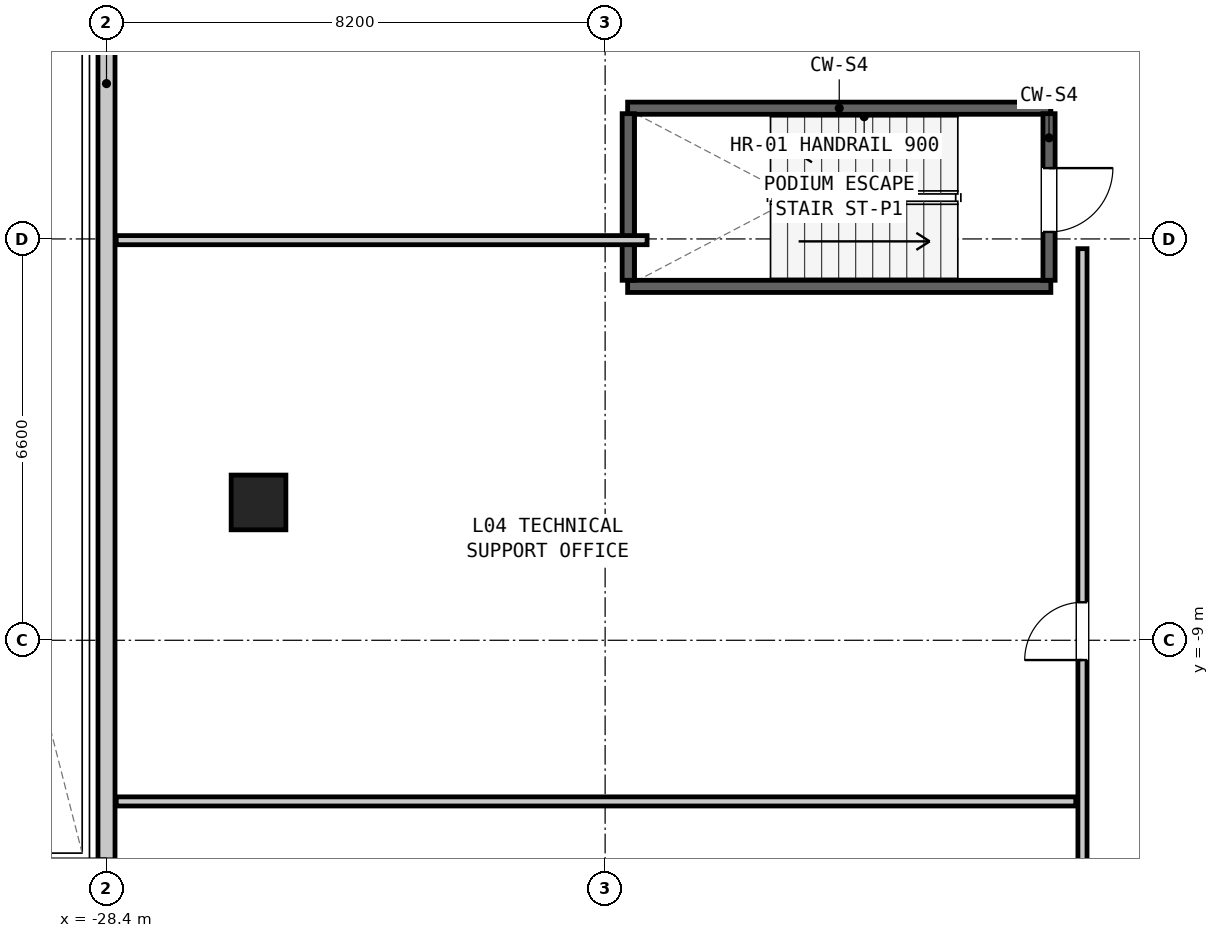
"""IFC4 building model, lengths in metres.
Left out: names, types, materials, properties, quantities, classifications, styles, units other than length and angle.
Written with IfcOpenShell. Run it as: python <this file> out.ifc"""

import sys

from ifc_helpers import new_model, si_unit, direction, frame, frame_2d, origin, origin_2d, place, context, subcontext, project, spatial, rectangle, hollow_rectangle, extrude, element, fill, save


model = new_model("IFC4")
c1 = context("Model", 3, precision=1e-05, world=origin(), true_north=direction((0.0, 1.0)))
c2 = subcontext(c1, "Body", "Model", "MODEL_VIEW")
j1 = project(units=[si_unit("LENGTHUNIT", "METRE"), si_unit("PLANEANGLEUNIT", "RADIAN")], contexts=[c1])
p1 = place(None, origin())
s1 = spatial("IfcSite", under=j1, at=p1, CompositionType="ELEMENT")
p2 = place(p1, origin())
s2 = spatial("IfcBuilding", under=s1, at=p2, CompositionType="ELEMENT")
p3 = place(p2, frame((0.0, 0.0, 17.7)))
s3 = spatial("IfcBuildingStorey", under=s2, at=p3, CompositionType="ELEMENT", Elevation=17.7)
p4 = place(p3, frame((-25.9, -6.733, 0.0), z_axis=(0.0, 0.0, 1.0), x_axis=(0.0, 1.0, 0.0)))
e1 = element("IfcColumn", 1, at=p4, inside=s3, PredefinedType="COLUMN", context=c2, shape_type="SweptSolid", body=[
    extrude(hollow_rectangle(XDim=0.9, YDim=0.9, WallThickness=0.055, at=origin_2d()), origin(), (0.0, 0.0, 1.0), 4.2),
])
for number, where, z_axis, x_axis in (
    (2, (-19.83, -0.25, 0.0), (0.0, 0.0, 1.0), (1.0, 0.0, 0.0)),
    (3, (-19.83, -3.18, 0.0), (0.0, 0.0, 1.0), (1.0, 0.0, 0.0)),
):
    element("IfcWall", number, at=place(p3, frame(where, z_axis=z_axis, x_axis=x_axis)), inside=s3, PredefinedType="SHEAR", context=c2, shape_type="SweptSolid", body=[
        extrude(rectangle(XDim=6.96, YDim=0.2, at=frame_2d((3.48, 0.0))), origin(), (0.0, 0.0, 1.0), 3.82),
    ])
p5 = place(p3, frame((-12.9, -0.34, 0.0), z_axis=(0.0, 0.0, 1.0), x_axis=(0.0, -1.0, 0.0)))
e4 = element("IfcWall", 4, at=p5, inside=s3, PredefinedType="SHEAR", context=c2, shape_type="SweptSolid", body=[
    extrude(rectangle(XDim=2.74, YDim=0.2, at=frame_2d((1.37, 0.0))), origin(), (0.0, 0.0, 1.0), 3.82),
])
p6 = place(p5, frame((0.895, 0.0, 0.0)))
e5 = element("IfcOpeningElement", 5, at=p6, cuts=e4, PredefinedType="OPENING", context=c2, shape_type="SweptSolid", body=[
    extrude(rectangle(XDim=1.05, YDim=2.08, at=frame_2d((0.525, 1.04))), frame((0.0, 0.112, 0.0), z_axis=(0.0, -1.0, 0.0), x_axis=(1.0, 0.0, 0.0)), (0.0, 0.0, 1.0), 0.224),
])
p7 = place(p3, frame((-19.82, -3.08, 0.0), z_axis=(0.0, 0.0, 1.0), x_axis=(0.0, 1.0, 0.0)))
e6 = element("IfcWall", 6, at=p7, inside=s3, PredefinedType="SHEAR", context=c2, shape_type="SweptSolid", body=[
    extrude(rectangle(XDim=2.74, YDim=0.2, at=frame_2d((1.37, 0.0))), origin(), (0.0, 0.0, 1.0), 3.82),
])
p8 = place(p3, frame((-28.4, -25.74, 0.0), z_axis=(0.0, 0.0, 1.0), x_axis=(0.0, 1.0, 0.0)))
e7 = element("IfcWall", 7, at=p8, inside=s3, PredefinedType="MOVABLE", context=c2, shape_type="SweptSolid", body=[
    extrude(rectangle(XDim=51.48, YDim=0.28, at=frame_2d((25.74, 0.0))), origin(), (0.0, 0.0, 1.0), 3.82),
])
p9 = place(p8, frame((11.149, 0.0, 0.0)))
e8 = element("IfcOpeningElement", 8, at=p9, cuts=e7, PredefinedType="OPENING", context=c2, shape_type="SweptSolid", body=[
    extrude(rectangle(XDim=2.0, YDim=2.14, at=frame_2d((1.0, 1.07))), frame((0.0, 0.152, 0.0), z_axis=(0.0, -1.0, 0.0), x_axis=(1.0, 0.0, 0.0)), (0.0, 0.0, 1.0), 0.304),
])
p10 = place(p8, frame((38.64, 0.0, 0.0)))
e9 = element("IfcOpeningElement", 9, at=p10, cuts=e7, PredefinedType="OPENING", context=c2, shape_type="SweptSolid", body=[
    extrude(rectangle(XDim=2.0, YDim=2.14, at=frame_2d((1.0, 1.07))), frame((0.0, 0.152, 0.0), z_axis=(0.0, -1.0, 0.0), x_axis=(1.0, 0.0, 0.0)), (0.0, 0.0, 1.0), 0.304),
])
p11 = place(p3, frame((-12.35, -15.14, 0.0), z_axis=(0.0, 0.0, 1.0), x_axis=(0.0, 1.0, 0.0)))
e10 = element("IfcWall", 10, at=p11, inside=s3, PredefinedType="PARTITIONING", context=c2, shape_type="SweptSolid", body=[
    extrude(rectangle(XDim=12.58, YDim=0.15, at=frame_2d((6.29, 0.0))), origin(), (0.0, 0.0, 1.0), 3.82),
])
p12 = place(p11, frame((5.815, 0.0, 0.0)))
e11 = element("IfcOpeningElement", 11, at=p12, cuts=e10, PredefinedType="OPENING", context=c2, shape_type="SweptSolid", body=[
    extrude(rectangle(XDim=0.95, YDim=2.1, at=frame_2d((0.475, 1.05))), frame((0.0, 0.087, 0.0), z_axis=(0.0, -1.0, 0.0), x_axis=(1.0, 0.0, 0.0)), (0.0, 0.0, 1.0), 0.174),
])
p13 = place(p3, frame((-28.24, -2.42, 0.0), z_axis=(0.0, 0.0, 1.0), x_axis=(1.0, 0.0, 0.0)))
e12 = element("IfcWall", 12, at=p13, inside=s3, PredefinedType="PARTITIONING", context=c2, shape_type="SweptSolid", body=[
    extrude(rectangle(XDim=8.73, YDim=0.15, at=frame_2d((4.365, 0.0))), origin(), (0.0, 0.0, 1.0), 2.682),
])
p14 = place(p3, frame((-28.24, -11.65, 0.0), z_axis=(0.0, 0.0, 1.0), x_axis=(1.0, 0.0, 0.0)))
e13 = element("IfcWall", 13, at=p14, inside=s3, PredefinedType="PARTITIONING", context=c2, shape_type="SweptSolid", body=[
    extrude(rectangle(XDim=15.78, YDim=0.15, at=frame_2d((7.89, 0.0))), origin(), (0.0, 0.0, 1.0), 3.82),
])
p15 = place(p6, origin())
e14 = element("IfcDoor", 14, at=p15, inside=s3, OperationType="SINGLE_SWING_LEFT", PredefinedType="DOOR", context=c2, shape_type="SweptSolid", body=[
    extrude(rectangle(XDim=1.05, YDim=2.08, at=frame_2d((0.525, 1.04))), frame((0.0, 0.025, 0.0), z_axis=(0.0, -1.0, 0.0), x_axis=(1.0, 0.0, 0.0)), (0.0, 0.0, 1.0), 0.05),
])
fill(e5, e14)
p16 = place(p9, origin())
e15 = element("IfcDoor", 15, at=p16, inside=s3, OperationType="DOUBLE_DOOR_SINGLE_SWING", PredefinedType="DOOR", context=c2, shape_type="SweptSolid", body=[
    extrude(rectangle(XDim=2.0, YDim=2.14, at=frame_2d((1.0, 1.07))), frame((0.0, 0.025, 0.0), z_axis=(0.0, -1.0, 0.0), x_axis=(1.0, 0.0, 0.0)), (0.0, 0.0, 1.0), 0.05),
])
fill(e8, e15)
p17 = place(p12, origin())
e16 = element("IfcDoor", 16, at=p17, inside=s3, OperationType="SINGLE_SWING_LEFT", PredefinedType="DOOR", context=c2, shape_type="SweptSolid", body=[
    extrude(rectangle(XDim=0.95, YDim=2.1, at=frame_2d((0.475, 1.05))), frame((0.0, 0.025, 0.0), z_axis=(0.0, -1.0, 0.0), x_axis=(1.0, 0.0, 0.0)), (0.0, 0.0, 1.0), 0.05),
])
fill(e11, e16)
save(model, sys.argv[1])
